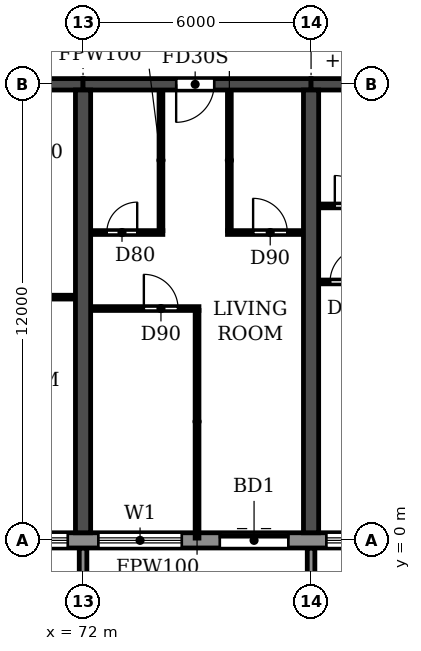
"""IFC4 building model, lengths in metres.
Left out: names, types, materials, properties, quantities, classifications, styles, units other than length and angle.
Written with IfcOpenShell. Run it as: python <this file> out.ifc"""

import sys

from ifc_helpers import new_model, si_unit, direction, frame, frame_2d, origin, place, context, subcontext, project, spatial, polyline, rectangle, outline, extrude, source, transform, mapped, element, fill, save


model = new_model("IFC4")
c1 = context("Model", 3, precision=1e-05, world=origin(), true_north=direction((0.0, 1.0)))
c2 = subcontext(c1, "Body", "Model", "MODEL_VIEW")
j1 = project(units=[si_unit("LENGTHUNIT", "METRE"), si_unit("PLANEANGLEUNIT", "RADIAN")], contexts=[c1])
p1 = place(None, origin())
s1 = spatial("IfcSite", under=j1, at=p1, CompositionType="ELEMENT")
p2 = place(p1, origin())
s2 = spatial("IfcBuilding", under=s1, at=p2, CompositionType="ELEMENT")
p3 = place(p2, frame((0.0, 0.0, 43.2)))
s3 = spatial("IfcBuildingStorey", under=s2, at=p3, CompositionType="ELEMENT", Elevation=43.2)
for number, where, z_axis, x_axis in (
    (1, (72.0, 0.2, 0.0), (0.0, 0.0, 1.0), (0.0, 1.0, 0.0)),
    (2, (78.0, 0.2, 0.0), (0.0, 0.0, 1.0), (0.0, 1.0, 0.0)),
):
    element("IfcWall", number, at=place(p3, frame(where, z_axis=z_axis, x_axis=x_axis)), inside=s3, PredefinedType="SHEAR", context=c2, shape_type="SweptSolid", body=[
        extrude(rectangle(XDim=11.65, YDim=0.4, at=frame_2d((5.825, 0.0))), origin(), (0.0, 0.0, 1.0), 3.05),
    ])
p4 = place(p3, frame((66.0, 12.0, 0.0), z_axis=(0.0, 0.0, 1.0), x_axis=(1.0, 0.0, 0.0)))
e3 = element("IfcWall", 3, at=p4, inside=s3, PredefinedType="SHEAR", context=c2, shape_type="SweptSolid", body=[
    extrude(rectangle(XDim=6.0, YDim=0.3, at=frame_2d((3.0, 0.0))), origin(), (0.0, 0.0, 1.0), 2.45),
])
p5 = place(p4, frame((2.55, 0.0, 0.0)))
e4 = element("IfcOpeningElement", 4, at=p5, cuts=e3, PredefinedType="OPENING", context=c2, shape_type="SweptSolid", body=[
    extrude(rectangle(XDim=1.0, YDim=2.1, at=frame_2d((0.5, 1.05))), frame((0.0, 0.16, 0.0), z_axis=(0.0, -1.0, 0.0), x_axis=(1.0, 0.0, 0.0)), (0.0, 0.0, 1.0), 0.32),
])
p6 = place(p3, frame((72.0, 12.0, 0.0), z_axis=(0.0, 0.0, 1.0), x_axis=(1.0, 0.0, 0.0)))
e5 = element("IfcWall", 5, at=p6, inside=s3, PredefinedType="SHEAR", context=c2, shape_type="SweptSolid", body=[
    extrude(rectangle(XDim=6.0, YDim=0.3, at=frame_2d((3.0, 0.0))), origin(), (0.0, 0.0, 1.0), 2.45),
])
p7 = place(p6, frame((2.45, 0.0, 0.0)))
e6 = element("IfcOpeningElement", 6, at=p7, cuts=e5, PredefinedType="OPENING", context=c2, shape_type="SweptSolid", body=[
    extrude(rectangle(XDim=1.0, YDim=2.1, at=frame_2d((0.5, 1.05))), frame((0.0, 0.16, 0.0), z_axis=(0.0, -1.0, 0.0), x_axis=(1.0, 0.0, 0.0)), (0.0, 0.0, 1.0), 0.32),
])
p8 = place(p3, frame((78.0, 12.0, 0.0), z_axis=(0.0, 0.0, 1.0), x_axis=(1.0, 0.0, 0.0)))
e7 = element("IfcWall", 7, at=p8, inside=s3, PredefinedType="SHEAR", context=c2, shape_type="SweptSolid", body=[
    extrude(rectangle(XDim=6.0, YDim=0.3, at=frame_2d((3.0, 0.0))), origin(), (0.0, 0.0, 1.0), 2.45),
])
p9 = place(p8, frame((2.45, 0.0, 0.0)))
e8 = element("IfcOpeningElement", 8, at=p9, cuts=e7, PredefinedType="OPENING", context=c2, shape_type="SweptSolid", body=[
    extrude(rectangle(XDim=1.0, YDim=2.1, at=frame_2d((0.5, 1.05))), frame((0.0, 0.16, 0.0), z_axis=(0.0, -1.0, 0.0), x_axis=(1.0, 0.0, 0.0)), (0.0, 0.0, 1.0), 0.32),
])
p10 = place(p3, frame((4.683, 0.0, 0.0), z_axis=(0.0, 0.0, 1.0), x_axis=(1.0, 0.0, 0.0)))
e9 = element("IfcWall", 9, at=p10, inside=s3, PredefinedType="STANDARD", context=c2, shape_type="SweptSolid", body=[
    extrude(rectangle(XDim=92.634, YDim=0.4, at=frame_2d((46.317, 0.0))), origin(), (0.0, 0.0, 1.0), 3.05),
])
p11 = place(p10, frame((1.717, 0.0, 0.9)))
e10 = element("IfcOpeningElement", 10, at=p11, cuts=e9, PredefinedType="OPENING", context=c2, shape_type="SweptSolid", body=[
    extrude(rectangle(XDim=2.2, YDim=1.5, at=frame_2d((1.1, 0.75))), frame((0.0, 0.21, 0.0), z_axis=(0.0, -1.0, 0.0), x_axis=(1.0, 0.0, 0.0)), (0.0, 0.0, 1.0), 0.42),
])
p12 = place(p10, frame((4.717, 0.0, 0.9)))
e11 = element("IfcOpeningElement", 11, at=p12, cuts=e9, PredefinedType="OPENING", context=c2, shape_type="SweptSolid", body=[
    extrude(rectangle(XDim=2.2, YDim=1.5, at=frame_2d((1.1, 0.75))), frame((0.0, 0.21, 0.0), z_axis=(0.0, -1.0, 0.0), x_axis=(1.0, 0.0, 0.0)), (0.0, 0.0, 1.0), 0.42),
])
p13 = place(p10, frame((7.717, 0.0, 0.9)))
e12 = element("IfcOpeningElement", 12, at=p13, cuts=e9, PredefinedType="OPENING", context=c2, shape_type="SweptSolid", body=[
    extrude(rectangle(XDim=2.2, YDim=1.5, at=frame_2d((1.1, 0.75))), frame((0.0, 0.21, 0.0), z_axis=(0.0, -1.0, 0.0), x_axis=(1.0, 0.0, 0.0)), (0.0, 0.0, 1.0), 0.42),
])
p14 = place(p10, frame((10.917, 0.0, 0.0)))
e13 = element("IfcOpeningElement", 13, at=p14, cuts=e9, PredefinedType="OPENING", context=c2, shape_type="SweptSolid", body=[
    extrude(rectangle(XDim=1.8, YDim=2.4, at=frame_2d((0.9, 1.2))), frame((0.0, 0.21, 0.0), z_axis=(0.0, -1.0, 0.0), x_axis=(1.0, 0.0, 0.0)), (0.0, 0.0, 1.0), 0.42),
])
p15 = place(p10, frame((13.717, 0.0, 0.9)))
e14 = element("IfcOpeningElement", 14, at=p15, cuts=e9, PredefinedType="OPENING", context=c2, shape_type="SweptSolid", body=[
    extrude(rectangle(XDim=2.2, YDim=1.5, at=frame_2d((1.1, 0.75))), frame((0.0, 0.21, 0.0), z_axis=(0.0, -1.0, 0.0), x_axis=(1.0, 0.0, 0.0)), (0.0, 0.0, 1.0), 0.42),
])
p16 = place(p10, frame((16.717, 0.0, 0.9)))
e15 = element("IfcOpeningElement", 15, at=p16, cuts=e9, PredefinedType="OPENING", context=c2, shape_type="SweptSolid", body=[
    extrude(rectangle(XDim=2.2, YDim=1.5, at=frame_2d((1.1, 0.75))), frame((0.0, 0.21, 0.0), z_axis=(0.0, -1.0, 0.0), x_axis=(1.0, 0.0, 0.0)), (0.0, 0.0, 1.0), 0.42),
])
p17 = place(p10, frame((19.917, 0.0, 0.0)))
e16 = element("IfcOpeningElement", 16, at=p17, cuts=e9, PredefinedType="OPENING", context=c2, shape_type="SweptSolid", body=[
    extrude(rectangle(XDim=1.8, YDim=2.4, at=frame_2d((0.9, 1.2))), frame((0.0, 0.21, 0.0), z_axis=(0.0, -1.0, 0.0), x_axis=(1.0, 0.0, 0.0)), (0.0, 0.0, 1.0), 0.42),
])
p18 = place(p10, frame((22.717, 0.0, 0.9)))
e17 = element("IfcOpeningElement", 17, at=p18, cuts=e9, PredefinedType="OPENING", context=c2, shape_type="SweptSolid", body=[
    extrude(rectangle(XDim=2.2, YDim=1.5, at=frame_2d((1.1, 0.75))), frame((0.0, 0.21, 0.0), z_axis=(0.0, -1.0, 0.0), x_axis=(1.0, 0.0, 0.0)), (0.0, 0.0, 1.0), 0.42),
])
p19 = place(p10, frame((25.717, 0.0, 0.9)))
e18 = element("IfcOpeningElement", 18, at=p19, cuts=e9, PredefinedType="OPENING", context=c2, shape_type="SweptSolid", body=[
    extrude(rectangle(XDim=2.2, YDim=1.5, at=frame_2d((1.1, 0.75))), frame((0.0, 0.21, 0.0), z_axis=(0.0, -1.0, 0.0), x_axis=(1.0, 0.0, 0.0)), (0.0, 0.0, 1.0), 0.42),
])
p20 = place(p10, frame((28.717, 0.0, 0.9)))
e19 = element("IfcOpeningElement", 19, at=p20, cuts=e9, PredefinedType="OPENING", context=c2, shape_type="SweptSolid", body=[
    extrude(rectangle(XDim=2.2, YDim=1.5, at=frame_2d((1.1, 0.75))), frame((0.0, 0.21, 0.0), z_axis=(0.0, -1.0, 0.0), x_axis=(1.0, 0.0, 0.0)), (0.0, 0.0, 1.0), 0.42),
])
p21 = place(p10, frame((31.717, 0.0, 0.9)))
e20 = element("IfcOpeningElement", 20, at=p21, cuts=e9, PredefinedType="OPENING", context=c2, shape_type="SweptSolid", body=[
    extrude(rectangle(XDim=2.2, YDim=1.5, at=frame_2d((1.1, 0.75))), frame((0.0, 0.21, 0.0), z_axis=(0.0, -1.0, 0.0), x_axis=(1.0, 0.0, 0.0)), (0.0, 0.0, 1.0), 0.42),
])
p22 = place(p10, frame((34.917, 0.0, 0.0)))
e21 = element("IfcOpeningElement", 21, at=p22, cuts=e9, PredefinedType="OPENING", context=c2, shape_type="SweptSolid", body=[
    extrude(rectangle(XDim=1.8, YDim=2.4, at=frame_2d((0.9, 1.2))), frame((0.0, 0.21, 0.0), z_axis=(0.0, -1.0, 0.0), x_axis=(1.0, 0.0, 0.0)), (0.0, 0.0, 1.0), 0.42),
])
p23 = place(p10, frame((37.717, 0.0, 0.9)))
e22 = element("IfcOpeningElement", 22, at=p23, cuts=e9, PredefinedType="OPENING", context=c2, shape_type="SweptSolid", body=[
    extrude(rectangle(XDim=2.2, YDim=1.5, at=frame_2d((1.1, 0.75))), frame((0.0, 0.21, 0.0), z_axis=(0.0, -1.0, 0.0), x_axis=(1.0, 0.0, 0.0)), (0.0, 0.0, 1.0), 0.42),
])
p24 = place(p10, frame((40.717, 0.0, 0.9)))
e23 = element("IfcOpeningElement", 23, at=p24, cuts=e9, PredefinedType="OPENING", context=c2, shape_type="SweptSolid", body=[
    extrude(rectangle(XDim=2.2, YDim=1.5, at=frame_2d((1.1, 0.75))), frame((0.0, 0.21, 0.0), z_axis=(0.0, -1.0, 0.0), x_axis=(1.0, 0.0, 0.0)), (0.0, 0.0, 1.0), 0.42),
])
p25 = place(p10, frame((43.717, 0.0, 0.9)))
e24 = element("IfcOpeningElement", 24, at=p25, cuts=e9, PredefinedType="OPENING", context=c2, shape_type="SweptSolid", body=[
    extrude(rectangle(XDim=2.2, YDim=1.5, at=frame_2d((1.1, 0.75))), frame((0.0, 0.21, 0.0), z_axis=(0.0, -1.0, 0.0), x_axis=(1.0, 0.0, 0.0)), (0.0, 0.0, 1.0), 0.42),
])
p26 = place(p10, frame((46.917, 0.0, 0.0)))
e25 = element("IfcOpeningElement", 25, at=p26, cuts=e9, PredefinedType="OPENING", context=c2, shape_type="SweptSolid", body=[
    extrude(rectangle(XDim=1.8, YDim=2.4, at=frame_2d((0.9, 1.2))), frame((0.0, 0.21, 0.0), z_axis=(0.0, -1.0, 0.0), x_axis=(1.0, 0.0, 0.0)), (0.0, 0.0, 1.0), 0.42),
])
p27 = place(p10, frame((49.717, 0.0, 0.9)))
e26 = element("IfcOpeningElement", 26, at=p27, cuts=e9, PredefinedType="OPENING", context=c2, shape_type="SweptSolid", body=[
    extrude(rectangle(XDim=2.2, YDim=1.5, at=frame_2d((1.1, 0.75))), frame((0.0, 0.21, 0.0), z_axis=(0.0, -1.0, 0.0), x_axis=(1.0, 0.0, 0.0)), (0.0, 0.0, 1.0), 0.42),
])
p28 = place(p10, frame((52.717, 0.0, 0.9)))
e27 = element("IfcOpeningElement", 27, at=p28, cuts=e9, PredefinedType="OPENING", context=c2, shape_type="SweptSolid", body=[
    extrude(rectangle(XDim=2.2, YDim=1.5, at=frame_2d((1.1, 0.75))), frame((0.0, 0.21, 0.0), z_axis=(0.0, -1.0, 0.0), x_axis=(1.0, 0.0, 0.0)), (0.0, 0.0, 1.0), 0.42),
])
p29 = place(p10, frame((55.717, 0.0, 0.9)))
e28 = element("IfcOpeningElement", 28, at=p29, cuts=e9, PredefinedType="OPENING", context=c2, shape_type="SweptSolid", body=[
    extrude(rectangle(XDim=2.2, YDim=1.5, at=frame_2d((1.1, 0.75))), frame((0.0, 0.21, 0.0), z_axis=(0.0, -1.0, 0.0), x_axis=(1.0, 0.0, 0.0)), (0.0, 0.0, 1.0), 0.42),
])
p30 = place(p10, frame((58.917, 0.0, 0.0)))
e29 = element("IfcOpeningElement", 29, at=p30, cuts=e9, PredefinedType="OPENING", context=c2, shape_type="SweptSolid", body=[
    extrude(rectangle(XDim=1.8, YDim=2.4, at=frame_2d((0.9, 1.2))), frame((0.0, 0.21, 0.0), z_axis=(0.0, -1.0, 0.0), x_axis=(1.0, 0.0, 0.0)), (0.0, 0.0, 1.0), 0.42),
])
p31 = place(p10, frame((61.717, 0.0, 0.9)))
e30 = element("IfcOpeningElement", 30, at=p31, cuts=e9, PredefinedType="OPENING", context=c2, shape_type="SweptSolid", body=[
    extrude(rectangle(XDim=2.2, YDim=1.5, at=frame_2d((1.1, 0.75))), frame((0.0, 0.21, 0.0), z_axis=(0.0, -1.0, 0.0), x_axis=(1.0, 0.0, 0.0)), (0.0, 0.0, 1.0), 0.42),
])
p32 = place(p10, frame((64.717, 0.0, 0.9)))
e31 = element("IfcOpeningElement", 31, at=p32, cuts=e9, PredefinedType="OPENING", context=c2, shape_type="SweptSolid", body=[
    extrude(rectangle(XDim=2.2, YDim=1.5, at=frame_2d((1.1, 0.75))), frame((0.0, 0.21, 0.0), z_axis=(0.0, -1.0, 0.0), x_axis=(1.0, 0.0, 0.0)), (0.0, 0.0, 1.0), 0.42),
])
p33 = place(p10, frame((67.717, 0.0, 0.9)))
e32 = element("IfcOpeningElement", 32, at=p33, cuts=e9, PredefinedType="OPENING", context=c2, shape_type="SweptSolid", body=[
    extrude(rectangle(XDim=2.2, YDim=1.5, at=frame_2d((1.1, 0.75))), frame((0.0, 0.21, 0.0), z_axis=(0.0, -1.0, 0.0), x_axis=(1.0, 0.0, 0.0)), (0.0, 0.0, 1.0), 0.42),
])
p34 = place(p10, frame((70.917, 0.0, 0.0)))
e33 = element("IfcOpeningElement", 33, at=p34, cuts=e9, PredefinedType="OPENING", context=c2, shape_type="SweptSolid", body=[
    extrude(rectangle(XDim=1.8, YDim=2.4, at=frame_2d((0.9, 1.2))), frame((0.0, 0.21, 0.0), z_axis=(0.0, -1.0, 0.0), x_axis=(1.0, 0.0, 0.0)), (0.0, 0.0, 1.0), 0.42),
])
p35 = place(p10, frame((73.717, 0.0, 0.9)))
e34 = element("IfcOpeningElement", 34, at=p35, cuts=e9, PredefinedType="OPENING", context=c2, shape_type="SweptSolid", body=[
    extrude(rectangle(XDim=2.2, YDim=1.5, at=frame_2d((1.1, 0.75))), frame((0.0, 0.21, 0.0), z_axis=(0.0, -1.0, 0.0), x_axis=(1.0, 0.0, 0.0)), (0.0, 0.0, 1.0), 0.42),
])
p36 = place(p10, frame((76.717, 0.0, 0.9)))
e35 = element("IfcOpeningElement", 35, at=p36, cuts=e9, PredefinedType="OPENING", context=c2, shape_type="SweptSolid", body=[
    extrude(rectangle(XDim=2.2, YDim=1.5, at=frame_2d((1.1, 0.75))), frame((0.0, 0.21, 0.0), z_axis=(0.0, -1.0, 0.0), x_axis=(1.0, 0.0, 0.0)), (0.0, 0.0, 1.0), 0.42),
])
p37 = place(p10, frame((79.717, 0.0, 0.9)))
e36 = element("IfcOpeningElement", 36, at=p37, cuts=e9, PredefinedType="OPENING", context=c2, shape_type="SweptSolid", body=[
    extrude(rectangle(XDim=2.2, YDim=1.5, at=frame_2d((1.1, 0.75))), frame((0.0, 0.21, 0.0), z_axis=(0.0, -1.0, 0.0), x_axis=(1.0, 0.0, 0.0)), (0.0, 0.0, 1.0), 0.42),
])
p38 = place(p10, frame((82.917, 0.0, 0.0)))
e37 = element("IfcOpeningElement", 37, at=p38, cuts=e9, PredefinedType="OPENING", context=c2, shape_type="SweptSolid", body=[
    extrude(rectangle(XDim=1.8, YDim=2.4, at=frame_2d((0.9, 1.2))), frame((0.0, 0.21, 0.0), z_axis=(0.0, -1.0, 0.0), x_axis=(1.0, 0.0, 0.0)), (0.0, 0.0, 1.0), 0.42),
])
p39 = place(p10, frame((85.717, 0.0, 0.9)))
e38 = element("IfcOpeningElement", 38, at=p39, cuts=e9, PredefinedType="OPENING", context=c2, shape_type="SweptSolid", body=[
    extrude(rectangle(XDim=2.2, YDim=1.5, at=frame_2d((1.1, 0.75))), frame((0.0, 0.21, 0.0), z_axis=(0.0, -1.0, 0.0), x_axis=(1.0, 0.0, 0.0)), (0.0, 0.0, 1.0), 0.42),
])
p40 = place(p10, frame((88.717, 0.0, 0.9)))
e39 = element("IfcOpeningElement", 39, at=p40, cuts=e9, PredefinedType="OPENING", context=c2, shape_type="SweptSolid", body=[
    extrude(rectangle(XDim=2.2, YDim=1.5, at=frame_2d((1.1, 0.75))), frame((0.0, 0.21, 0.0), z_axis=(0.0, -1.0, 0.0), x_axis=(1.0, 0.0, 0.0)), (0.0, 0.0, 1.0), 0.42),
])
m1 = source(origin(), c2, "Body", "SweptSolid", [
    extrude(outline(polyline([(0.0, 0.0), (0.2, 0.0), (0.2, 1.65), (0.0, 1.65), (0.0, 0.0)])), origin(), (0.0, 0.0, 1.0), 3.1),
])
for number, where in (
    (40, (71.9, -1.85, 0.0)),
    (41, (77.9, -1.85, 0.0)),
):
    element("IfcWall", number, at=place(p3, frame(where)), inside=s3, PredefinedType="STANDARD", context=c2, shape_type="MappedRepresentation", body=[
        mapped(m1, transform((0.0, 0.0, 0.0))),
    ])
p41 = place(p3, frame((72.21, 6.1, 0.0), z_axis=(0.0, 0.0, 1.0), x_axis=(1.0, 0.0, 0.0)))
e42 = element("IfcWall", 42, at=p41, inside=s3, PredefinedType="PARTITIONING", context=c2, shape_type="SweptSolid", body=[
    extrude(rectangle(XDim=2.84, YDim=0.1, at=frame_2d((1.42, 0.0))), origin(), (0.0, 0.0, 1.0), 3.05),
])
p42 = place(p41, frame((1.39, 0.0, 0.0)))
e43 = element("IfcOpeningElement", 43, at=p42, cuts=e42, PredefinedType="OPENING", context=c2, shape_type="SweptSolid", body=[
    extrude(rectangle(XDim=0.9, YDim=2.1, at=frame_2d((0.45, 1.05))), frame((0.0, 0.06, 0.0), z_axis=(0.0, -1.0, 0.0), x_axis=(1.0, 0.0, 0.0)), (0.0, 0.0, 1.0), 0.12),
])
p43 = place(p3, frame((69.9, 6.4, 0.0), z_axis=(0.0, 0.0, 1.0), x_axis=(1.0, 0.0, 0.0)))
e44 = element("IfcWall", 44, at=p43, inside=s3, PredefinedType="PARTITIONING", context=c2, shape_type="SweptSolid", body=[
    extrude(rectangle(XDim=1.89, YDim=0.1, at=frame_2d((0.945, 0.0))), origin(), (0.0, 0.0, 1.0), 3.05),
])
p44 = place(p3, frame((78.21, 6.8, 0.0), z_axis=(0.0, 0.0, 1.0), x_axis=(1.0, 0.0, 0.0)))
e45 = element("IfcWall", 45, at=p44, inside=s3, PredefinedType="PARTITIONING", context=c2, shape_type="SweptSolid", body=[
    extrude(rectangle(XDim=2.84, YDim=0.1, at=frame_2d((1.42, 0.0))), origin(), (0.0, 0.0, 1.0), 3.05),
])
p45 = place(p44, frame((0.29, 0.0, 0.0)))
e46 = element("IfcOpeningElement", 46, at=p45, cuts=e45, PredefinedType="OPENING", context=c2, shape_type="SweptSolid", body=[
    extrude(rectangle(XDim=0.9, YDim=2.1, at=frame_2d((0.45, 1.05))), frame((0.0, 0.06, 0.0), z_axis=(0.0, -1.0, 0.0), x_axis=(1.0, 0.0, 0.0)), (0.0, 0.0, 1.0), 0.12),
])
p46 = place(p3, frame((72.21, 8.1, 0.0), z_axis=(0.0, 0.0, 1.0), x_axis=(1.0, 0.0, 0.0)))
e47 = element("IfcWall", 47, at=p46, inside=s3, PredefinedType="PARTITIONING", context=c2, shape_type="SweptSolid", body=[
    extrude(rectangle(XDim=1.89, YDim=0.1, at=frame_2d((0.945, 0.0))), origin(), (0.0, 0.0, 1.0), 3.05),
])
p47 = place(p46, frame((0.415, 0.0, 0.0)))
e48 = element("IfcOpeningElement", 48, at=p47, cuts=e47, PredefinedType="OPENING", context=c2, shape_type="SweptSolid", body=[
    extrude(rectangle(XDim=0.8, YDim=2.1, at=frame_2d((0.4, 1.05))), frame((0.0, 0.06, 0.0), z_axis=(0.0, -1.0, 0.0), x_axis=(1.0, 0.0, 0.0)), (0.0, 0.0, 1.0), 0.12),
])
p48 = place(p3, frame((75.8, 8.1, 0.0), z_axis=(0.0, 0.0, 1.0), x_axis=(1.0, 0.0, 0.0)))
e49 = element("IfcWall", 49, at=p48, inside=s3, PredefinedType="PARTITIONING", context=c2, shape_type="SweptSolid", body=[
    extrude(rectangle(XDim=1.99, YDim=0.1, at=frame_2d((0.995, 0.0))), origin(), (0.0, 0.0, 1.0), 3.05),
])
p49 = place(p48, frame((0.675, 0.0, 0.0)))
e50 = element("IfcOpeningElement", 50, at=p49, cuts=e49, PredefinedType="OPENING", context=c2, shape_type="SweptSolid", body=[
    extrude(rectangle(XDim=0.9, YDim=2.1, at=frame_2d((0.45, 1.05))), frame((0.0, 0.06, 0.0), z_axis=(0.0, -1.0, 0.0), x_axis=(1.0, 0.0, 0.0)), (0.0, 0.0, 1.0), 0.12),
])
p50 = place(p3, frame((78.21, 8.8, 0.0), z_axis=(0.0, 0.0, 1.0), x_axis=(1.0, 0.0, 0.0)))
e51 = element("IfcWall", 51, at=p50, inside=s3, PredefinedType="PARTITIONING", context=c2, shape_type="SweptSolid", body=[
    extrude(rectangle(XDim=1.89, YDim=0.1, at=frame_2d((0.945, 0.0))), origin(), (0.0, 0.0, 1.0), 3.05),
])
p51 = place(p50, frame((0.415, 0.0, 0.0)))
e52 = element("IfcOpeningElement", 52, at=p51, cuts=e51, PredefinedType="OPENING", context=c2, shape_type="SweptSolid", body=[
    extrude(rectangle(XDim=0.8, YDim=2.1, at=frame_2d((0.4, 1.05))), frame((0.0, 0.06, 0.0), z_axis=(0.0, -1.0, 0.0), x_axis=(1.0, 0.0, 0.0)), (0.0, 0.0, 1.0), 0.12),
])
p52 = place(p3, frame((74.05, 8.15, 0.0), z_axis=(0.0, 0.0, 1.0), x_axis=(0.0, 1.0, 0.0)))
e53 = element("IfcWall", 53, at=p52, inside=s3, PredefinedType="PARTITIONING", context=c2, shape_type="SweptSolid", body=[
    extrude(rectangle(XDim=3.69, YDim=0.1, at=frame_2d((1.845, 0.0))), origin(), (0.0, 0.0, 1.0), 3.05),
])
p53 = place(p3, frame((75.0, 0.06, 0.0), z_axis=(0.0, 0.0, 1.0), x_axis=(0.0, 1.0, 0.0)))
e54 = element("IfcWall", 54, at=p53, inside=s3, PredefinedType="PARTITIONING", context=c2, shape_type="SweptSolid", body=[
    extrude(rectangle(XDim=5.99, YDim=0.1, at=frame_2d((2.995, 0.0))), origin(), (0.0, 0.0, 1.0), 3.05),
])
p54 = place(p3, frame((75.85, 8.15, 0.0), z_axis=(0.0, 0.0, 1.0), x_axis=(0.0, 1.0, 0.0)))
e55 = element("IfcWall", 55, at=p54, inside=s3, PredefinedType="PARTITIONING", context=c2, shape_type="SweptSolid", body=[
    extrude(rectangle(XDim=3.69, YDim=0.1, at=frame_2d((1.845, 0.0))), origin(), (0.0, 0.0, 1.0), 3.05),
])
p55 = place(p32, origin())
e56 = element("IfcWindow", 56, at=p55, inside=s3, PartitioningType="DOUBLE_PANEL_HORIZONTAL", PredefinedType="WINDOW", context=c2, shape_type="SweptSolid", body=[
    extrude(rectangle(XDim=2.2, YDim=1.5, at=frame_2d((1.1, 0.75))), frame((0.0, 0.03, 0.0), z_axis=(0.0, -1.0, 0.0), x_axis=(1.0, 0.0, 0.0)), (0.0, 0.0, 1.0), 0.06),
])
fill(e31, e56)
p56 = place(p33, origin())
e57 = element("IfcWindow", 57, at=p56, inside=s3, PartitioningType="DOUBLE_PANEL_HORIZONTAL", PredefinedType="WINDOW", context=c2, shape_type="SweptSolid", body=[
    extrude(rectangle(XDim=2.2, YDim=1.5, at=frame_2d((1.1, 0.75))), frame((0.0, 0.03, 0.0), z_axis=(0.0, -1.0, 0.0), x_axis=(1.0, 0.0, 0.0)), (0.0, 0.0, 1.0), 0.06),
])
fill(e32, e57)
p57 = place(p34, origin())
e58 = element("IfcDoor", 58, at=p57, inside=s3, OperationType="DOUBLE_DOOR_SLIDING", PredefinedType="DOOR", context=c2, shape_type="SweptSolid", body=[
    extrude(rectangle(XDim=1.8, YDim=2.4, at=frame_2d((0.9, 1.2))), frame((0.0, 0.025, 0.0), z_axis=(0.0, -1.0, 0.0), x_axis=(1.0, 0.0, 0.0)), (0.0, 0.0, 1.0), 0.05),
])
fill(e33, e58)
p58 = place(p35, origin())
e59 = element("IfcWindow", 59, at=p58, inside=s3, PartitioningType="DOUBLE_PANEL_HORIZONTAL", PredefinedType="WINDOW", context=c2, shape_type="SweptSolid", body=[
    extrude(rectangle(XDim=2.2, YDim=1.5, at=frame_2d((1.1, 0.75))), frame((0.0, 0.03, 0.0), z_axis=(0.0, -1.0, 0.0), x_axis=(1.0, 0.0, 0.0)), (0.0, 0.0, 1.0), 0.06),
])
fill(e34, e59)
p59 = place(p47, origin())
e60 = element("IfcDoor", 60, at=p59, inside=s3, OperationType="SINGLE_SWING_RIGHT", PredefinedType="DOOR", context=c2, shape_type="SweptSolid", body=[
    extrude(rectangle(XDim=0.8, YDim=2.1, at=frame_2d((0.4, 1.05))), frame((0.0, 0.025, 0.0), z_axis=(0.0, -1.0, 0.0), x_axis=(1.0, 0.0, 0.0)), (0.0, 0.0, 1.0), 0.05),
])
fill(e48, e60)
p60 = place(p42, origin())
e61 = element("IfcDoor", 61, at=p60, inside=s3, OperationType="SINGLE_SWING_LEFT", PredefinedType="DOOR", context=c2, shape_type="SweptSolid", body=[
    extrude(rectangle(XDim=0.9, YDim=2.1, at=frame_2d((0.45, 1.05))), frame((0.0, 0.025, 0.0), z_axis=(0.0, -1.0, 0.0), x_axis=(1.0, 0.0, 0.0)), (0.0, 0.0, 1.0), 0.05),
])
fill(e43, e61)
p61 = place(p7, frame((1.0, 0.0, 0.0), z_axis=(0.0, 0.0, 1.0), x_axis=(-1.0, 0.0, 0.0)))
e62 = element("IfcDoor", 62, at=p61, inside=s3, OperationType="SINGLE_SWING_RIGHT", PredefinedType="DOOR", context=c2, shape_type="SweptSolid", body=[
    extrude(rectangle(XDim=1.0, YDim=2.1, at=frame_2d((0.5, 1.05))), frame((0.0, 0.025, 0.0), z_axis=(0.0, -1.0, 0.0), x_axis=(1.0, 0.0, 0.0)), (0.0, 0.0, 1.0), 0.05),
])
fill(e6, e62)
p62 = place(p49, origin())
e63 = element("IfcDoor", 63, at=p62, inside=s3, OperationType="SINGLE_SWING_LEFT", PredefinedType="DOOR", context=c2, shape_type="SweptSolid", body=[
    extrude(rectangle(XDim=0.9, YDim=2.1, at=frame_2d((0.45, 1.05))), frame((0.0, 0.025, 0.0), z_axis=(0.0, -1.0, 0.0), x_axis=(1.0, 0.0, 0.0)), (0.0, 0.0, 1.0), 0.05),
])
fill(e50, e63)
p63 = place(p45, origin())
e64 = element("IfcDoor", 64, at=p63, inside=s3, OperationType="SINGLE_SWING_RIGHT", PredefinedType="DOOR", context=c2, shape_type="SweptSolid", body=[
    extrude(rectangle(XDim=0.9, YDim=2.1, at=frame_2d((0.45, 1.05))), frame((0.0, 0.025, 0.0), z_axis=(0.0, -1.0, 0.0), x_axis=(1.0, 0.0, 0.0)), (0.0, 0.0, 1.0), 0.05),
])
fill(e46, e64)
p64 = place(p51, origin())
e65 = element("IfcDoor", 65, at=p64, inside=s3, OperationType="SINGLE_SWING_LEFT", PredefinedType="DOOR", context=c2, shape_type="SweptSolid", body=[
    extrude(rectangle(XDim=0.8, YDim=2.1, at=frame_2d((0.4, 1.05))), frame((0.0, 0.025, 0.0), z_axis=(0.0, -1.0, 0.0), x_axis=(1.0, 0.0, 0.0)), (0.0, 0.0, 1.0), 0.05),
])
fill(e52, e65)
save(model, sys.argv[1])
